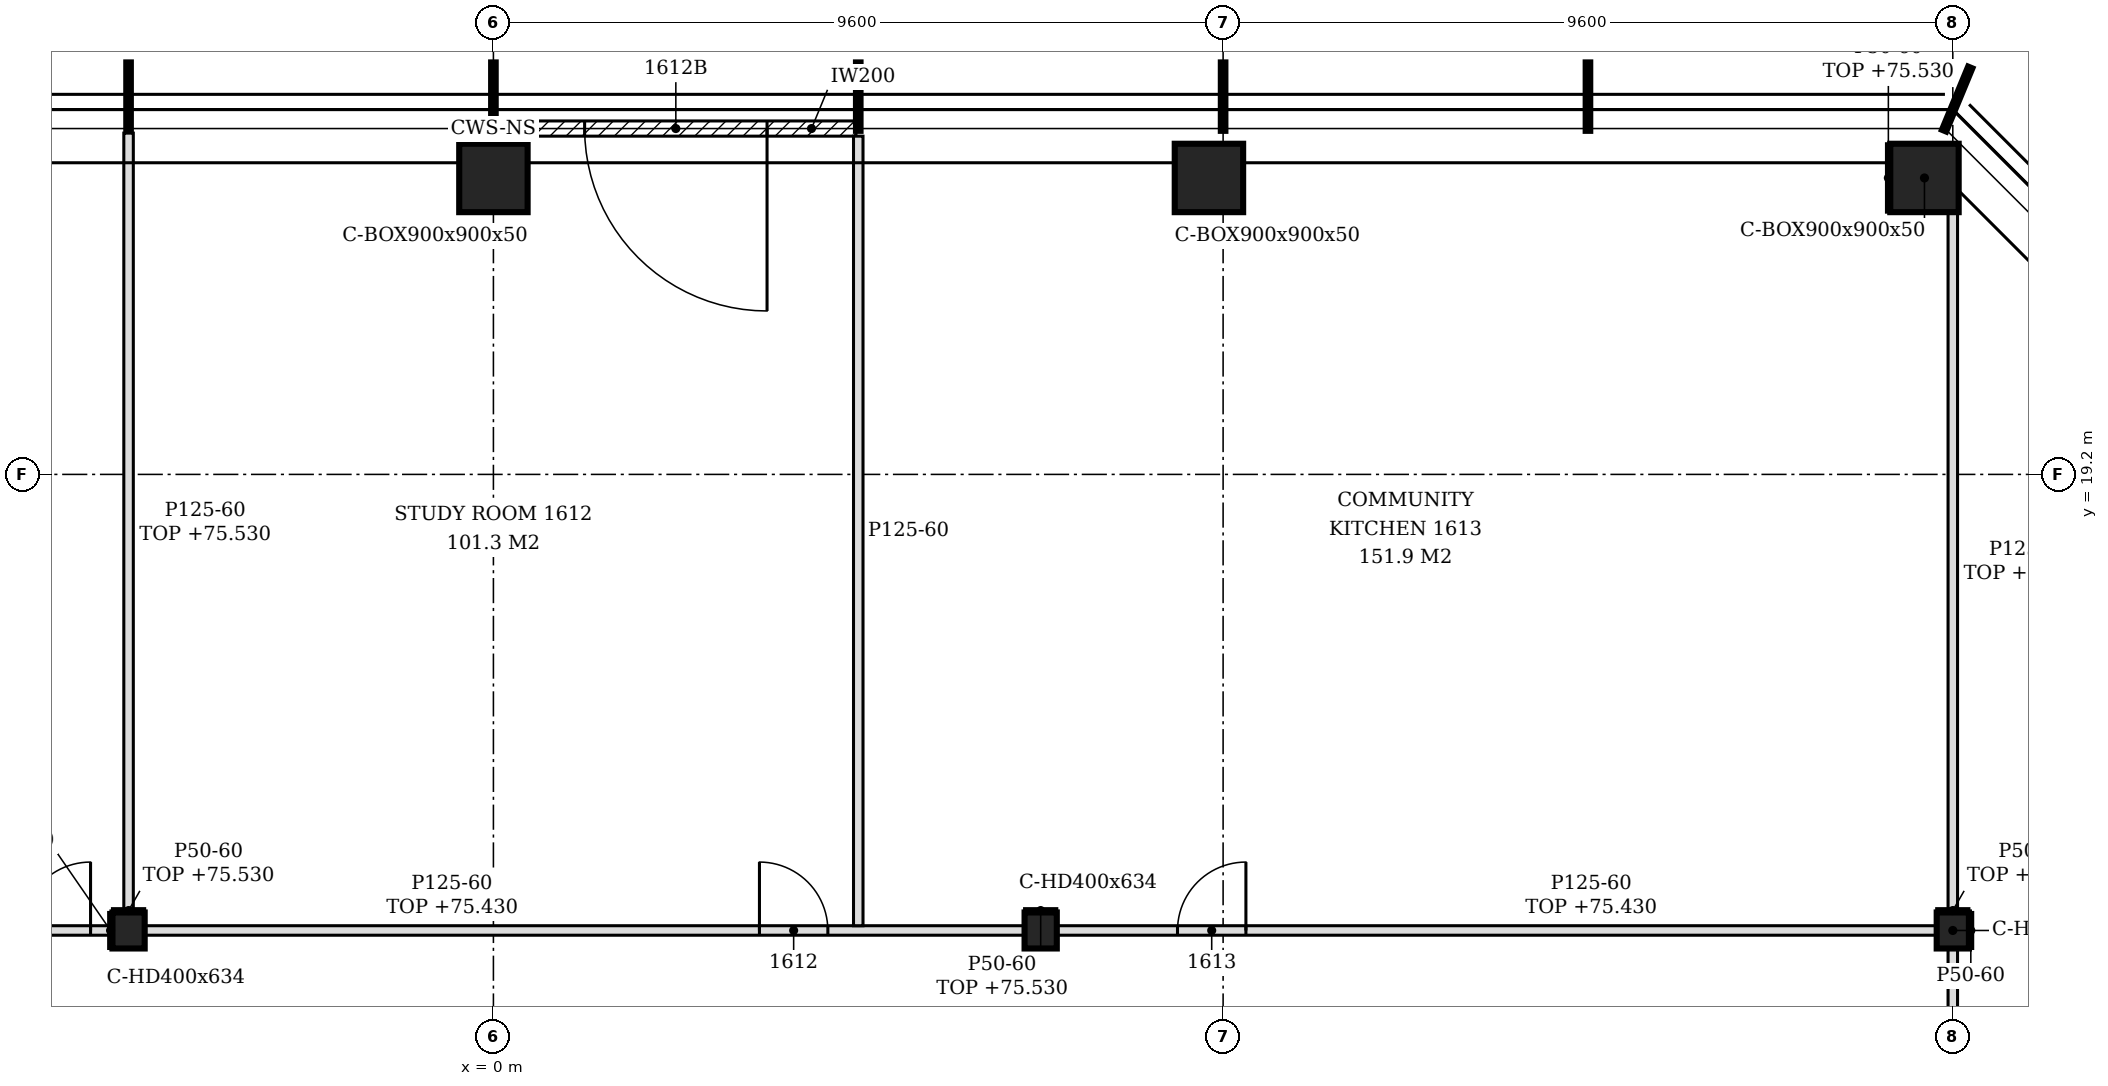
"""IFC4 building model, lengths in metres.
Left out: names, types, materials, properties, quantities, classifications, styles, units other than length and angle.
Written with IfcOpenShell. Run it as: python <this file> out.ifc"""

import sys

from ifc_helpers import new_model, si_unit, direction, frame, frame_2d, origin, origin_2d, place, context, subcontext, project, spatial, polyline, rectangle, hollow_rectangle, i_section, outline, extrude, element, fill, save


model = new_model("IFC4")
c1 = context("Model", 3, precision=1e-05, world=origin(), true_north=direction((0.0, 1.0)))
c2 = subcontext(c1, "Body", "Model", "MODEL_VIEW")
j1 = project(units=[si_unit("LENGTHUNIT", "METRE"), si_unit("PLANEANGLEUNIT", "RADIAN")], contexts=[c1])
p1 = place(None, origin())
s1 = spatial("IfcSite", under=j1, at=p1, CompositionType="ELEMENT")
p2 = place(p1, origin())
s2 = spatial("IfcBuilding", under=s1, at=p2, CompositionType="ELEMENT")
p3 = place(p2, frame((0.0, 0.0, 72.6)))
s3 = spatial("IfcBuildingStorey", under=s2, at=p3, CompositionType="ELEMENT", Elevation=72.6)
for number, where, z_axis, x_axis in (
    (1, (18.827, 23.1, -0.15), (0.0, 0.0, 1.0), (1.0, 0.0, 0.0)),
    (2, (9.414, 23.1, -0.15), (0.0, 0.0, 1.0), (1.0, 0.0, 0.0)),
    (3, (0.0, 23.1, -0.15), (0.0, 0.0, 1.0), (1.0, 0.0, 0.0)),
):
    element("IfcColumn", number, at=place(p3, frame(where, z_axis=z_axis, x_axis=x_axis)), inside=s3, PredefinedType="COLUMN", context=c2, shape_type="SweptSolid", body=[
        extrude(hollow_rectangle(XDim=0.9, YDim=0.9, WallThickness=0.05, at=origin_2d()), origin(), (0.0, 0.0, 1.0), 3.6),
    ])
for number, where, z_axis, x_axis in (
    (4, (-4.8, 13.2, -0.15), (0.0, 0.0, 1.0), (1.0, 0.0, 0.0)),
    (5, (7.2, 13.2, -0.15), (0.0, 0.0, 1.0), (1.0, 0.0, 0.0)),
    (6, (19.2, 13.2, -0.15), (0.0, 0.0, 1.0), (1.0, 0.0, 0.0)),
):
    element("IfcColumn", number, at=place(p3, frame(where, z_axis=z_axis, x_axis=x_axis)), inside=s3, PredefinedType="COLUMN", context=c2, shape_type="SweptSolid", body=[
        extrude(i_section(OverallWidth=0.424, OverallDepth=0.474, WebThickness=0.048, FlangeThickness=0.077, FilletRadius=0.015, at=origin_2d()), origin(), (0.0, 0.0, 1.0), 3.6),
    ])
p4 = place(p3, frame((4.77, 23.75, 0.0), z_axis=(0.0, 0.0, 1.0), x_axis=(-1.0, 0.0, 0.0)))
e7 = element("IfcWall", 7, at=p4, inside=s3, PredefinedType="NOTDEFINED", context=c2, shape_type="SweptSolid", body=[
    extrude(rectangle(XDim=4.74, YDim=0.2, at=frame_2d((2.37, 0.0))), origin(), (0.0, 0.0, 1.0), 3.45),
])
p5 = place(p4, frame((1.17, 0.0, 0.0)))
e8 = element("IfcOpeningElement", 8, at=p5, cuts=e7, PredefinedType="OPENING", context=c2, shape_type="SweptSolid", body=[
    extrude(rectangle(XDim=2.4, YDim=2.4, at=frame_2d((1.2, 1.2))), frame((0.0, 0.11, 0.0), z_axis=(0.0, -1.0, 0.0), x_axis=(1.0, 0.0, 0.0)), (0.0, 0.0, 1.0), 0.22),
])
p6 = place(p3, frame((19.2, 2.637, 0.0), z_axis=(0.0, 0.0, 1.0), x_axis=(0.0, 1.0, 0.0)))
e9 = element("IfcWall", 9, at=p6, inside=s3, PredefinedType="PARTITIONING", context=c2, shape_type="SweptSolid", body=[
    extrude(rectangle(XDim=10.326, YDim=0.125, at=frame_2d((5.163, 0.0))), origin(), (0.0, 0.0, 1.0), 2.83),
])
p7 = place(p6, frame((5.763, 0.0, 0.0)))
e10 = element("IfcOpeningElement", 10, at=p7, cuts=e9, PredefinedType="OPENING", context=c2, shape_type="SweptSolid", body=[
    extrude(rectangle(XDim=0.9, YDim=2.1, at=frame_2d((0.45, 1.05))), frame((0.0, 0.073, 0.0), z_axis=(0.0, -1.0, 0.0), x_axis=(1.0, 0.0, 0.0)), (0.0, 0.0, 1.0), 0.145),
])
p8 = place(p3, frame((-18.413, 13.2, 0.0), z_axis=(0.0, 0.0, 1.0), x_axis=(1.0, 0.0, 0.0)))
e11 = element("IfcWall", 11, at=p8, inside=s3, PredefinedType="PARTITIONING", context=c2, shape_type="SweptSolid", body=[
    extrude(outline(polyline([(0.0, 0.0), (13.401, 0.0), (13.4, 3.45), (4.163, 3.45), (4.16, 2.93), (3.863, 2.93), (3.861, 3.45), (0.0, 3.45), (0.0, 0.0)])), frame((0.0, 0.062, 0.0), z_axis=(0.0, -1.0, 0.0), x_axis=(1.0, 0.0, 0.0)), (0.0, 0.0, 1.0), 0.125),
])
p9 = place(p8, frame((11.312, 0.0, 0.0)))
e12 = element("IfcOpeningElement", 12, at=p9, cuts=e11, PredefinedType="OPENING", context=c2, shape_type="SweptSolid", body=[
    extrude(rectangle(XDim=1.8, YDim=2.1, at=frame_2d((0.9, 1.05))), frame((0.0, 0.073, 0.0), z_axis=(0.0, -1.0, 0.0), x_axis=(1.0, 0.0, 0.0)), (0.0, 0.0, 1.0), 0.145),
])
p10 = place(p3, frame((-4.588, 13.2, 0.0), z_axis=(0.0, 0.0, 1.0), x_axis=(1.0, 0.0, 0.0)))
e13 = element("IfcWall", 13, at=p10, inside=s3, PredefinedType="PARTITIONING", context=c2, shape_type="SweptSolid", body=[
    extrude(rectangle(XDim=11.576, YDim=0.125, at=frame_2d((5.788, 0.0))), origin(), (0.0, 0.0, 1.0), 2.83),
])
p11 = place(p10, frame((8.088, 0.0, 0.0)))
e14 = element("IfcOpeningElement", 14, at=p11, cuts=e13, PredefinedType="OPENING", context=c2, shape_type="SweptSolid", body=[
    extrude(rectangle(XDim=0.9, YDim=2.1, at=frame_2d((0.45, 1.05))), frame((0.0, 0.073, 0.0), z_axis=(0.0, -1.0, 0.0), x_axis=(1.0, 0.0, 0.0)), (0.0, 0.0, 1.0), 0.145),
])
p12 = place(p3, frame((7.412, 13.2, 0.0), z_axis=(0.0, 0.0, 1.0), x_axis=(1.0, 0.0, 0.0)))
e15 = element("IfcWall", 15, at=p12, inside=s3, PredefinedType="PARTITIONING", context=c2, shape_type="SweptSolid", body=[
    extrude(rectangle(XDim=11.576, YDim=0.125, at=frame_2d((5.788, 0.0))), origin(), (0.0, 0.0, 1.0), 2.83),
])
p13 = place(p12, frame((1.588, 0.0, 0.0)))
e16 = element("IfcOpeningElement", 16, at=p13, cuts=e15, PredefinedType="OPENING", context=c2, shape_type="SweptSolid", body=[
    extrude(rectangle(XDim=0.9, YDim=2.1, at=frame_2d((0.45, 1.05))), frame((0.0, 0.073, 0.0), z_axis=(0.0, -1.0, 0.0), x_axis=(1.0, 0.0, 0.0)), (0.0, 0.0, 1.0), 0.145),
])
p14 = place(p3, frame((4.8, 13.262, 0.0), z_axis=(0.0, 0.0, 1.0), x_axis=(0.0, 1.0, 0.0)))
e17 = element("IfcWall", 17, at=p14, inside=s3, PredefinedType="PARTITIONING", context=c2, shape_type="SweptSolid", body=[
    extrude(outline(polyline([(0.0, 0.0), (10.387, 0.0), (10.387, 3.45), (9.988, 3.45), (9.986, 2.93), (9.688, 2.93), (9.686, 3.45), (6.042, 3.45), (6.041, 2.88), (5.833, 2.88), (5.831, 3.45), (0.087, 3.45), (0.085, 2.83), (0.0, 2.83), (0.0, 0.0)])), frame((0.0, 0.062, 0.0), z_axis=(0.0, -1.0, 0.0), x_axis=(1.0, 0.0, 0.0)), (0.0, 0.0, 1.0), 0.125),
])
p15 = place(p3, frame((-4.8, 13.437, 0.0), z_axis=(0.0, 0.0, 1.0), x_axis=(0.0, 1.0, 0.0)))
e18 = element("IfcWall", 18, at=p15, inside=s3, PredefinedType="PARTITIONING", context=c2, shape_type="SweptSolid", body=[
    extrude(rectangle(XDim=10.253, YDim=0.125, at=frame_2d((5.126, 0.0))), origin(), (0.0, 0.0, 1.0), 2.93),
])
p16 = place(p3, frame((19.2, 13.437, 0.0), z_axis=(0.0, 0.0, 1.0), x_axis=(0.0, 1.0, 0.0)))
e19 = element("IfcWall", 19, at=p16, inside=s3, PredefinedType="PARTITIONING", context=c2, shape_type="SweptSolid", body=[
    extrude(outline(polyline([(0.0, 0.0), (9.213, 0.0), (9.213, 2.63), (8.733, 2.63), (8.731, 2.93), (0.0, 2.93), (0.0, 0.0)])), frame((0.0, 0.062, 0.0), z_axis=(0.0, -1.0, 0.0), x_axis=(1.0, 0.0, 0.0)), (0.0, 0.0, 1.0), 0.125),
])
p17 = place(p3, frame((19.437, 12.963, 0.0), z_axis=(0.0, 0.0, 1.0), x_axis=(0.0, 1.0, 0.0)))
e20 = element("IfcWall", 20, at=p17, inside=s3, PredefinedType="PARTITIONING", context=c2, shape_type="SweptSolid", body=[
    extrude(rectangle(XDim=0.474, YDim=0.05, at=frame_2d((0.237, 0.0))), origin(), (0.0, 0.0, 1.0), 3.45),
])
for number, where, z_axis, x_axis in (
    (21, (-5.012, 13.462, 0.0), (0.0, 0.0, 1.0), (1.0, 0.0, 0.0)),
    (22, (6.988, 13.462, 0.0), (0.0, 0.0, 1.0), (1.0, 0.0, 0.0)),
    (23, (18.988, 13.462, 0.0), (0.0, 0.0, 1.0), (1.0, 0.0, 0.0)),
):
    element("IfcWall", number, at=place(p3, frame(where, z_axis=z_axis, x_axis=x_axis)), inside=s3, PredefinedType="PARTITIONING", context=c2, shape_type="SweptSolid", body=[
        extrude(rectangle(XDim=0.424, YDim=0.05, at=frame_2d((0.212, 0.0))), origin(), (0.0, 0.0, 1.0), 2.93),
    ])
p18 = place(p3, frame((18.352, 22.65, 0.0), z_axis=(0.0, 0.0, 1.0), x_axis=(0.0, 1.0, 0.0)))
e24 = element("IfcWall", 24, at=p18, inside=s3, PredefinedType="PARTITIONING", context=c2, shape_type="SweptSolid", body=[
    extrude(rectangle(XDim=0.9, YDim=0.05, at=frame_2d((0.45, 0.0))), origin(), (0.0, 0.0, 1.0), 2.93),
])
p19 = place(p3, frame((-5.037, 12.963, 0.0), z_axis=(0.0, 0.0, 1.0), x_axis=(0.0, 1.0, 0.0)))
e25 = element("IfcWall", 25, at=p19, inside=s3, PredefinedType="PARTITIONING", context=c2, shape_type="SweptSolid", body=[
    extrude(rectangle(XDim=0.474, YDim=0.05, at=frame_2d((0.237, 0.0))), origin(), (0.0, 0.0, 1.0), 3.45),
])
p20 = place(p5, origin())
e26 = element("IfcDoor", 26, at=p20, inside=s3, OperationType="SINGLE_SWING_LEFT", PredefinedType="DOOR", context=c2, shape_type="SweptSolid", body=[
    extrude(rectangle(XDim=2.4, YDim=2.4, at=frame_2d((1.2, 1.2))), frame((0.0, 0.025, 0.0), z_axis=(0.0, -1.0, 0.0), x_axis=(1.0, 0.0, 0.0)), (0.0, 0.0, 1.0), 0.05),
])
fill(e8, e26)
p21 = place(p9, origin())
e27 = element("IfcDoor", 27, at=p21, inside=s3, OperationType="DOUBLE_DOOR_SINGLE_SWING", PredefinedType="DOOR", context=c2, shape_type="SweptSolid", body=[
    extrude(rectangle(XDim=1.8, YDim=2.1, at=frame_2d((0.9, 1.05))), frame((0.0, 0.025, 0.0), z_axis=(0.0, -1.0, 0.0), x_axis=(1.0, 0.0, 0.0)), (0.0, 0.0, 1.0), 0.05),
])
fill(e12, e27)
p22 = place(p11, origin())
e28 = element("IfcDoor", 28, at=p22, inside=s3, OperationType="SINGLE_SWING_LEFT", PredefinedType="DOOR", context=c2, shape_type="SweptSolid", body=[
    extrude(rectangle(XDim=0.9, YDim=2.1, at=frame_2d((0.45, 1.05))), frame((0.0, 0.025, 0.0), z_axis=(0.0, -1.0, 0.0), x_axis=(1.0, 0.0, 0.0)), (0.0, 0.0, 1.0), 0.05),
])
fill(e14, e28)
p23 = place(p13, origin())
e29 = element("IfcDoor", 29, at=p23, inside=s3, OperationType="SINGLE_SWING_RIGHT", PredefinedType="DOOR", context=c2, shape_type="SweptSolid", body=[
    extrude(rectangle(XDim=0.9, YDim=2.1, at=frame_2d((0.45, 1.05))), frame((0.0, 0.025, 0.0), z_axis=(0.0, -1.0, 0.0), x_axis=(1.0, 0.0, 0.0)), (0.0, 0.0, 1.0), 0.05),
])
fill(e16, e29)
save(model, sys.argv[1])
